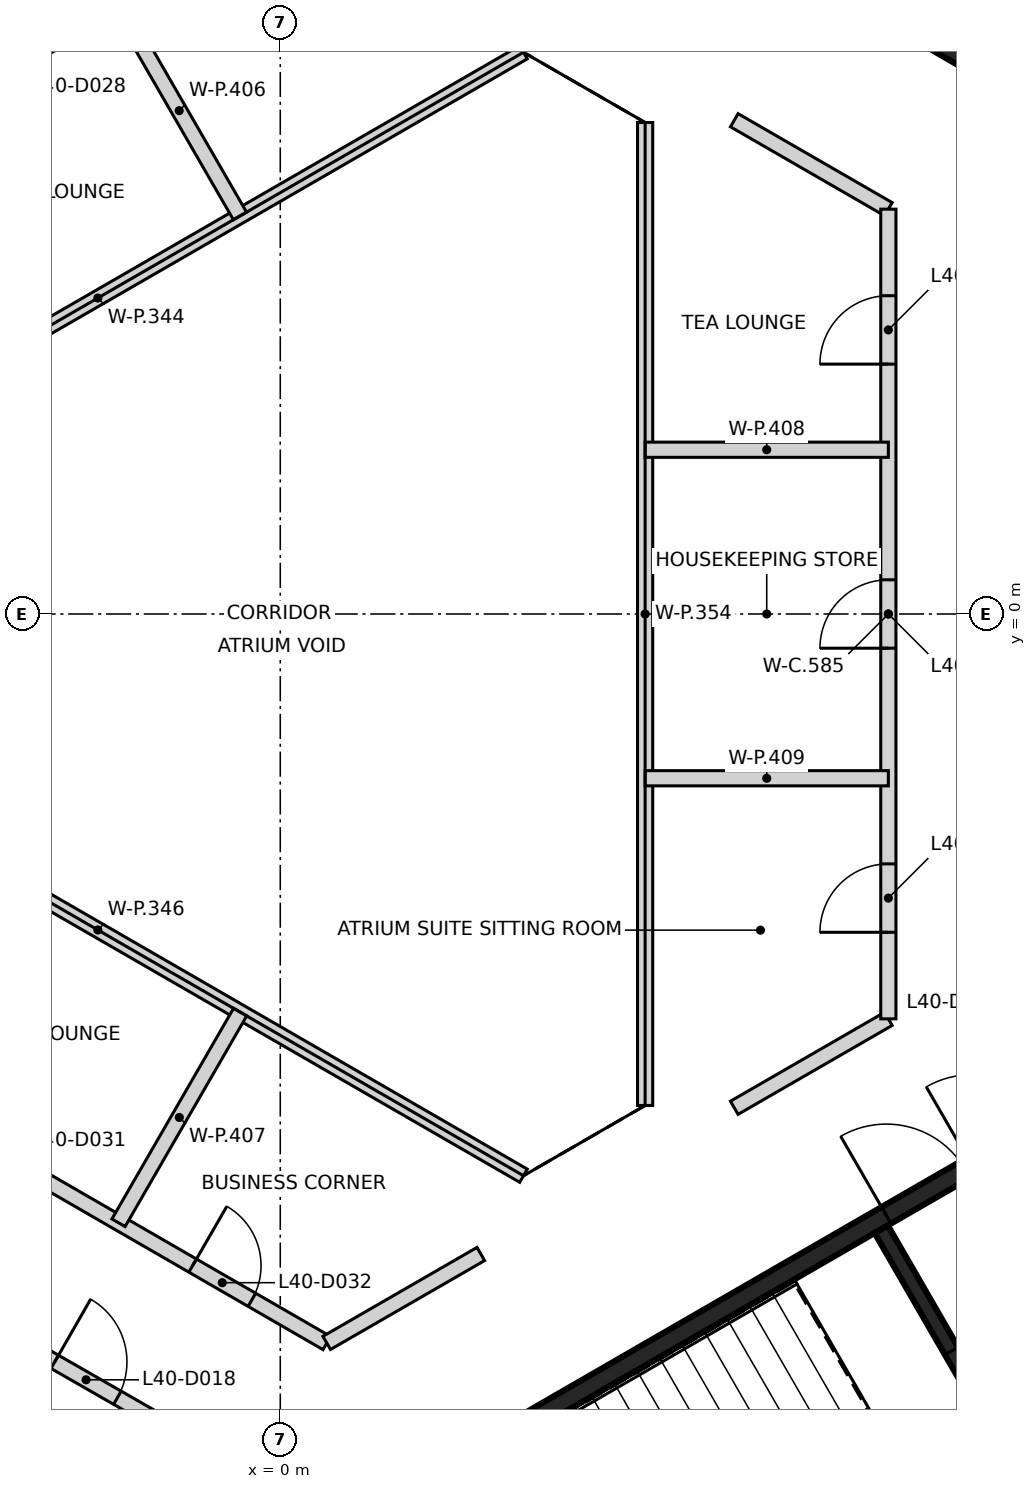
"""IFC4 building model, lengths in metres.
Left out: names, types, materials, properties, quantities, classifications, styles, units other than length and angle.
Written with IfcOpenShell. Run it as: python <this file> out.ifc"""

import sys

from ifc_helpers import new_model, si_unit, direction, frame, frame_2d, origin, place, context, subcontext, project, spatial, rectangle, extrude, element, fill, save


model = new_model("IFC4")
c1 = context("Model", 3, precision=1e-05, world=origin(), true_north=direction((0.0, 1.0)))
c2 = subcontext(c1, "Body", "Model", "MODEL_VIEW")
j1 = project(units=[si_unit("LENGTHUNIT", "METRE"), si_unit("PLANEANGLEUNIT", "RADIAN")], contexts=[c1])
p1 = place(None, origin())
s1 = spatial("IfcSite", under=j1, at=p1, CompositionType="ELEMENT")
p2 = place(p1, origin())
s2 = spatial("IfcBuilding", under=s1, at=p2, CompositionType="ELEMENT")
p3 = place(p2, frame((0.0, 0.0, 161.2)))
s3 = spatial("IfcBuildingStorey", under=s2, at=p3, CompositionType="ELEMENT", Elevation=161.2)
p4 = place(p3, frame((10.42, 6.498, 0.0), z_axis=(0.0, 0.0, 1.0), x_axis=(-0.866021906294, 0.500006057782, 0.0)))
e1 = element("IfcWall", 1, at=p4, inside=s3, PredefinedType="SHEAR", context=c2, shape_type="SweptSolid", body=[
    extrude(rectangle(XDim=11.55, YDim=0.25, at=frame_2d((5.775, 0.0))), origin(), (0.0, 0.0, 1.0), 3.2),
])
p5 = place(p4, frame((10.025, 0.0, 0.0)))
e2 = element("IfcOpeningElement", 2, at=p5, cuts=e1, PredefinedType="OPENING", context=c2, shape_type="SweptSolid", body=[
    extrude(rectangle(XDim=1.2, YDim=2.1, at=frame_2d((0.6, 1.05))), frame((0.0, 0.135, 0.0), z_axis=(0.0, -1.0, 0.0), x_axis=(1.0, 0.0, 0.0)), (0.0, 0.0, 1.0), 0.27),
])
p6 = place(p4, frame((8.725, 0.0, 0.0)))
e3 = element("IfcOpeningElement", 3, at=p6, cuts=e1, PredefinedType="OPENING", context=c2, shape_type="SweptSolid", body=[
    extrude(rectangle(XDim=1.2, YDim=2.1, at=frame_2d((0.6, 1.05))), frame((0.0, 0.135, 0.0), z_axis=(0.0, -1.0, 0.0), x_axis=(1.0, 0.0, 0.0)), (0.0, 0.0, 1.0), 0.27),
])
p7 = place(p3, frame((0.417, -12.273, 0.0), z_axis=(0.0, 0.0, 1.0), x_axis=(0.866021906294, 0.500006057782, 0.0)))
e4 = element("IfcWall", 4, at=p7, inside=s3, PredefinedType="SHEAR", context=c2, shape_type="SweptSolid", body=[
    extrude(rectangle(XDim=11.55, YDim=0.25, at=frame_2d((5.775, 0.0))), origin(), (0.0, 0.0, 1.0), 3.2),
])
p8 = place(p7, frame((10.025, 0.0, 0.0)))
e5 = element("IfcOpeningElement", 5, at=p8, cuts=e4, PredefinedType="OPENING", context=c2, shape_type="SweptSolid", body=[
    extrude(rectangle(XDim=1.2, YDim=2.1, at=frame_2d((0.6, 1.05))), frame((0.0, 0.135, 0.0), z_axis=(0.0, -1.0, 0.0), x_axis=(1.0, 0.0, 0.0)), (0.0, 0.0, 1.0), 0.27),
])
p9 = place(p7, frame((8.725, 0.0, 0.0)))
e6 = element("IfcOpeningElement", 6, at=p9, cuts=e4, PredefinedType="OPENING", context=c2, shape_type="SweptSolid", body=[
    extrude(rectangle(XDim=1.2, YDim=2.1, at=frame_2d((0.6, 1.05))), frame((0.0, 0.135, 0.0), z_axis=(0.0, -1.0, 0.0), x_axis=(1.0, 0.0, 0.0)), (0.0, 0.0, 1.0), 0.27),
])
p10 = place(p3, frame((7.906, -8.094, 0.0), z_axis=(0.0, 0.0, 1.0), x_axis=(0.500024287448, -0.866011380966, 0.0)))
e7 = element("IfcWall", 7, at=p10, inside=s3, PredefinedType="SHEAR", context=c2, shape_type="SweptSolid", body=[
    extrude(rectangle(XDim=5.251, YDim=0.2, at=frame_2d((2.625, 0.0))), origin(), (0.0, 0.0, 1.0), 3.2),
])
p11 = place(p10, frame((1.849, 0.0, 0.0)))
e8 = element("IfcOpeningElement", 8, at=p11, cuts=e7, PredefinedType="OPENING", context=c2, shape_type="SweptSolid", body=[
    extrude(rectangle(XDim=1.4, YDim=2.1, at=frame_2d((0.7, 1.05))), frame((0.0, 0.11, 0.0), z_axis=(0.0, -1.0, 0.0), x_axis=(1.0, 0.0, 0.0)), (0.0, 0.0, 1.0), 0.22),
])
p12 = place(p3, frame((-10.642, -5.44, 0.0), z_axis=(0.0, 0.0, 1.0), x_axis=(0.867610688994, -0.497244097344, 0.0)))
e9 = element("IfcWall", 9, at=p12, inside=s3, PredefinedType="PARTITIONING", context=c2, shape_type="SweptSolid", body=[
    extrude(rectangle(XDim=10.464, YDim=0.2, at=frame_2d((5.232, 0.0))), origin(), (0.0, 0.0, 1.0), 3.2),
])
p13 = place(p12, frame((0.2, 0.0, 0.0)))
e10 = element("IfcOpeningElement", 10, at=p13, cuts=e9, PredefinedType="OPENING", context=c2, shape_type="SweptSolid", body=[
    extrude(rectangle(XDim=0.95, YDim=2.1, at=frame_2d((0.475, 1.05))), frame((0.0, 0.11, 0.0), z_axis=(0.0, -1.0, 0.0), x_axis=(1.0, 0.0, 0.0)), (0.0, 0.0, 1.0), 0.22),
])
p14 = place(p12, frame((7.519, 0.0, 0.0)))
e11 = element("IfcOpeningElement", 11, at=p14, cuts=e9, PredefinedType="OPENING", context=c2, shape_type="SweptSolid", body=[
    extrude(rectangle(XDim=0.95, YDim=2.1, at=frame_2d((0.475, 1.05))), frame((0.0, 0.11, 0.0), z_axis=(0.0, -1.0, 0.0), x_axis=(1.0, 0.0, 0.0)), (0.0, 0.0, 1.0), 0.22),
])
p15 = place(p12, frame((8.846, 0.0, 0.0)))
e12 = element("IfcOpeningElement", 12, at=p15, cuts=e9, PredefinedType="OPENING", context=c2, shape_type="SweptSolid", body=[
    extrude(rectangle(XDim=0.95, YDim=2.1, at=frame_2d((0.475, 1.05))), frame((0.0, 0.11, 0.0), z_axis=(0.0, -1.0, 0.0), x_axis=(1.0, 0.0, 0.0)), (0.0, 0.0, 1.0), 0.22),
])
p16 = place(p3, frame((-8.612, -4.265, 0.0), z_axis=(0.0, 0.0, 1.0), x_axis=(0.865984415152, -0.500070987675, 0.0)))
e13 = element("IfcWall", 13, at=p16, inside=s3, PredefinedType="PARTITIONING", context=c2, shape_type="SweptSolid", body=[
    extrude(rectangle(XDim=10.651, YDim=0.2, at=frame_2d((5.326, 0.0))), origin(), (0.0, 0.0, 1.0), 3.2),
])
p17 = place(p16, frame((1.138, 0.0, 0.0)))
e14 = element("IfcOpeningElement", 14, at=p17, cuts=e13, PredefinedType="OPENING", context=c2, shape_type="SweptSolid", body=[
    extrude(rectangle(XDim=0.9, YDim=2.1, at=frame_2d((0.45, 1.05))), frame((0.0, 0.11, 0.0), z_axis=(0.0, -1.0, 0.0), x_axis=(1.0, 0.0, 0.0)), (0.0, 0.0, 1.0), 0.22),
])
p18 = place(p16, frame((4.876, 0.0, 0.0)))
e15 = element("IfcOpeningElement", 15, at=p18, cuts=e13, PredefinedType="OPENING", context=c2, shape_type="SweptSolid", body=[
    extrude(rectangle(XDim=0.9, YDim=2.1, at=frame_2d((0.45, 1.05))), frame((0.0, 0.11, 0.0), z_axis=(0.0, -1.0, 0.0), x_axis=(1.0, 0.0, 0.0)), (0.0, 0.0, 1.0), 0.22),
])
p19 = place(p16, frame((8.613, 0.0, 0.0)))
e16 = element("IfcOpeningElement", 16, at=p19, cuts=e13, PredefinedType="OPENING", context=c2, shape_type="SweptSolid", body=[
    extrude(rectangle(XDim=0.9, YDim=2.1, at=frame_2d((0.45, 1.05))), frame((0.0, 0.11, 0.0), z_axis=(0.0, -1.0, 0.0), x_axis=(1.0, 0.0, 0.0)), (0.0, 0.0, 1.0), 0.22),
])
p20 = place(p3, frame((-8.612, 4.265, 0.0), z_axis=(0.0, 0.0, 1.0), x_axis=(0.865984415152, 0.500070987675, 0.0)))
e17 = element("IfcWall", 17, at=p20, inside=s3, PredefinedType="PARTITIONING", context=c2, shape_type="SweptSolid", body=[
    extrude(rectangle(XDim=10.651, YDim=0.2, at=frame_2d((5.326, 0.0))), origin(), (0.0, 0.0, 1.0), 3.2),
])
p21 = place(p20, frame((8.613, 0.0, 0.0)))
e18 = element("IfcOpeningElement", 18, at=p21, cuts=e17, PredefinedType="OPENING", context=c2, shape_type="SweptSolid", body=[
    extrude(rectangle(XDim=0.9, YDim=2.1, at=frame_2d((0.45, 1.05))), frame((0.0, 0.11, 0.0), z_axis=(0.0, -1.0, 0.0), x_axis=(1.0, 0.0, 0.0)), (0.0, 0.0, 1.0), 0.22),
])
p22 = place(p20, frame((4.876, 0.0, 0.0)))
e19 = element("IfcOpeningElement", 19, at=p22, cuts=e17, PredefinedType="OPENING", context=c2, shape_type="SweptSolid", body=[
    extrude(rectangle(XDim=0.9, YDim=2.1, at=frame_2d((0.45, 1.05))), frame((0.0, 0.11, 0.0), z_axis=(0.0, -1.0, 0.0), x_axis=(1.0, 0.0, 0.0)), (0.0, 0.0, 1.0), 0.22),
])
p23 = place(p20, frame((1.138, 0.0, 0.0)))
e20 = element("IfcOpeningElement", 20, at=p23, cuts=e17, PredefinedType="OPENING", context=c2, shape_type="SweptSolid", body=[
    extrude(rectangle(XDim=0.9, YDim=2.1, at=frame_2d((0.45, 1.05))), frame((0.0, 0.11, 0.0), z_axis=(0.0, -1.0, 0.0), x_axis=(1.0, 0.0, 0.0)), (0.0, 0.0, 1.0), 0.22),
])
p24 = place(p3, frame((-8.462, 6.664, 0.0), z_axis=(0.0, 0.0, 1.0), x_axis=(0.864575369233, 0.502503165081, 0.0)))
e21 = element("IfcWall", 21, at=p24, inside=s3, PredefinedType="PARTITIONING", context=c2, shape_type="SweptSolid", body=[
    extrude(rectangle(XDim=10.492, YDim=0.2, at=frame_2d((5.246, 0.0))), origin(), (0.0, 0.0, 1.0), 3.2),
])
p25 = place(p24, frame((9.292, 0.0, 0.0)))
e22 = element("IfcOpeningElement", 22, at=p25, cuts=e21, PredefinedType="OPENING", context=c2, shape_type="SweptSolid", body=[
    extrude(rectangle(XDim=1.0, YDim=2.1, at=frame_2d((0.5, 1.05))), frame((0.0, 0.11, 0.0), z_axis=(0.0, -1.0, 0.0), x_axis=(1.0, 0.0, 0.0)), (0.0, 0.0, 1.0), 0.22),
])
p26 = place(p24, frame((2.024, 0.0, 0.0)))
e23 = element("IfcOpeningElement", 23, at=p26, cuts=e21, PredefinedType="OPENING", context=c2, shape_type="SweptSolid", body=[
    extrude(rectangle(XDim=0.95, YDim=2.1, at=frame_2d((0.475, 1.05))), frame((0.0, 0.11, 0.0), z_axis=(0.0, -1.0, 0.0), x_axis=(1.0, 0.0, 0.0)), (0.0, 0.0, 1.0), 0.22),
])
p27 = place(p24, frame((0.698, 0.0, 0.0)))
e24 = element("IfcOpeningElement", 24, at=p27, cuts=e21, PredefinedType="OPENING", context=c2, shape_type="SweptSolid", body=[
    extrude(rectangle(XDim=0.95, YDim=2.1, at=frame_2d((0.475, 1.05))), frame((0.0, 0.11, 0.0), z_axis=(0.0, -1.0, 0.0), x_axis=(1.0, 0.0, 0.0)), (0.0, 0.0, 1.0), 0.22),
])
p28 = place(p3, frame((0.611, -9.589, 0.0), z_axis=(0.0, 0.0, 1.0), x_axis=(0.866220316572, 0.499662249082, 0.0)))
e25 = element("IfcWall", 25, at=p28, inside=s3, PredefinedType="PARTITIONING", context=c2, shape_type="SweptSolid", body=[
    extrude(rectangle(XDim=2.34, YDim=0.2, at=frame_2d((1.17, 0.0))), origin(), (0.0, 0.0, 1.0), 3.2),
])
for number, where, z_axis, x_axis in (
    (26, (5.973, -6.496, 0.0), (0.0, 0.0, 1.0), (0.866, 0.5, 0.0)),
    (27, (5.973, 6.496, 0.0), (0.0, 0.0, 1.0), (0.866, -0.5, 0.0)),
):
    element("IfcWall", number, at=place(p3, frame(where, z_axis=z_axis, x_axis=x_axis)), inside=s3, PredefinedType="PARTITIONING", context=c2, shape_type="SweptSolid", body=[
        extrude(rectangle(XDim=2.341, YDim=0.2, at=frame_2d((1.17, 0.0))), origin(), (0.0, 0.0, 1.0), 3.2),
    ])
p29 = place(p3, frame((8.0, -5.326, 0.0), z_axis=(0.0, 0.0, 1.0), x_axis=(0.0, 1.0, 0.0)))
e28 = element("IfcWall", 28, at=p29, inside=s3, PredefinedType="PARTITIONING", context=c2, shape_type="SweptSolid", body=[
    extrude(rectangle(XDim=10.652, YDim=0.2, at=frame_2d((5.326, 0.0))), origin(), (0.0, 0.0, 1.0), 3.2),
])
p30 = place(p29, frame((1.138, 0.0, 0.0)))
e29 = element("IfcOpeningElement", 29, at=p30, cuts=e28, PredefinedType="OPENING", context=c2, shape_type="SweptSolid", body=[
    extrude(rectangle(XDim=0.9, YDim=2.1, at=frame_2d((0.45, 1.05))), frame((0.0, 0.11, 0.0), z_axis=(0.0, -1.0, 0.0), x_axis=(1.0, 0.0, 0.0)), (0.0, 0.0, 1.0), 0.22),
])
p31 = place(p29, frame((4.876, 0.0, 0.0)))
e30 = element("IfcOpeningElement", 30, at=p31, cuts=e28, PredefinedType="OPENING", context=c2, shape_type="SweptSolid", body=[
    extrude(rectangle(XDim=0.9, YDim=2.1, at=frame_2d((0.45, 1.05))), frame((0.0, 0.11, 0.0), z_axis=(0.0, -1.0, 0.0), x_axis=(1.0, 0.0, 0.0)), (0.0, 0.0, 1.0), 0.22),
])
p32 = place(p29, frame((8.614, 0.0, 0.0)))
e31 = element("IfcOpeningElement", 31, at=p32, cuts=e28, PredefinedType="OPENING", context=c2, shape_type="SweptSolid", body=[
    extrude(rectangle(XDim=0.9, YDim=2.1, at=frame_2d((0.45, 1.05))), frame((0.0, 0.11, 0.0), z_axis=(0.0, -1.0, 0.0), x_axis=(1.0, 0.0, 0.0)), (0.0, 0.0, 1.0), 0.22),
])
for number, where, z_axis, x_axis in (
    (32, (-8.0, 0.924, 0.0), (0.0, 0.0, 1.0), (0.866, 0.5, 0.0)),
    (33, (-8.0, -0.924, 0.0), (0.0, 0.0, 1.0), (0.866, -0.5, 0.0)),
):
    element("IfcWall", number, at=place(p3, frame(where, z_axis=z_axis, x_axis=x_axis)), inside=s3, PredefinedType="PARTITIONING", context=c2, shape_type="SweptSolid", body=[
        extrude(rectangle(XDim=12.932, YDim=0.2, at=frame_2d((6.466, 0.0))), origin(), (0.0, 0.0, 1.0), 2.3),
    ])
p33 = place(p3, frame((-2.13, 8.008, 0.0), z_axis=(0.0, 0.0, 1.0), x_axis=(0.499872130319, -0.866099216793, 0.0)))
e34 = element("IfcWall", 34, at=p33, inside=s3, PredefinedType="PARTITIONING", context=c2, shape_type="SweptSolid", body=[
    extrude(rectangle(XDim=3.2, YDim=0.2, at=frame_2d((1.6, 0.0))), origin(), (0.0, 0.0, 1.0), 2.3),
])
p34 = place(p3, frame((-2.128, -8.009, 0.0), z_axis=(0.0, 0.0, 1.0), x_axis=(0.499986558861, 0.866033163891, 0.0)))
e35 = element("IfcWall", 35, at=p34, inside=s3, PredefinedType="PARTITIONING", context=c2, shape_type="SweptSolid", body=[
    extrude(rectangle(XDim=3.201, YDim=0.2, at=frame_2d((1.6, 0.0))), origin(), (0.0, 0.0, 1.0), 2.3),
])
p35 = place(p3, frame((4.8, -6.466, 0.0), z_axis=(0.0, 0.0, 1.0), x_axis=(0.0, 1.0, 0.0)))
e36 = element("IfcWall", 36, at=p35, inside=s3, PredefinedType="PARTITIONING", context=c2, shape_type="SweptSolid", body=[
    extrude(rectangle(XDim=12.932, YDim=0.2, at=frame_2d((6.466, 0.0))), origin(), (0.0, 0.0, 1.0), 2.3),
])
p36 = place(p3, frame((4.8, 2.161, 0.0), z_axis=(0.0, 0.0, 1.0), x_axis=(1.0, 0.0, 0.0)))
e37 = element("IfcWall", 37, at=p36, inside=s3, PredefinedType="PARTITIONING", context=c2, shape_type="SweptSolid", body=[
    extrude(rectangle(XDim=3.2, YDim=0.2, at=frame_2d((1.6, 0.0))), origin(), (0.0, 0.0, 1.0), 2.3),
])
p37 = place(p3, frame((4.8, -2.161, 0.0), z_axis=(0.0, 0.0, 1.0), x_axis=(1.0, 0.0, 0.0)))
e38 = element("IfcWall", 38, at=p37, inside=s3, PredefinedType="PARTITIONING", context=c2, shape_type="SweptSolid", body=[
    extrude(rectangle(XDim=3.2, YDim=0.2, at=frame_2d((1.6, 0.0))), origin(), (0.0, 0.0, 1.0), 3.2),
])
p38 = place(p9, origin())
e39 = element("IfcDoor", 39, at=p38, inside=s3, OperationType="SINGLE_SWING_RIGHT", PredefinedType="DOOR", context=c2, shape_type="SweptSolid", body=[
    extrude(rectangle(XDim=1.2, YDim=2.1, at=frame_2d((0.6, 1.05))), frame((0.0, 0.025, 0.0), z_axis=(0.0, -1.0, 0.0), x_axis=(1.0, 0.0, 0.0)), (0.0, 0.0, 1.0), 0.05),
])
fill(e6, e39)
p39 = place(p11, origin())
e40 = element("IfcDoor", 40, at=p39, inside=s3, OperationType="SINGLE_SWING_RIGHT", PredefinedType="DOOR", context=c2, shape_type="SweptSolid", body=[
    extrude(rectangle(XDim=1.4, YDim=2.1, at=frame_2d((0.7, 1.05))), frame((0.0, 0.025, 0.0), z_axis=(0.0, -1.0, 0.0), x_axis=(1.0, 0.0, 0.0)), (0.0, 0.0, 1.0), 0.05),
])
fill(e8, e40)
p40 = place(p15, frame((0.95, 0.0, 0.0), z_axis=(0.0, 0.0, 1.0), x_axis=(-1.0, 0.0, 0.0)))
e41 = element("IfcDoor", 41, at=p40, inside=s3, OperationType="SINGLE_SWING_LEFT", PredefinedType="DOOR", context=c2, shape_type="SweptSolid", body=[
    extrude(rectangle(XDim=0.95, YDim=2.1, at=frame_2d((0.475, 1.05))), frame((0.0, 0.025, 0.0), z_axis=(0.0, -1.0, 0.0), x_axis=(1.0, 0.0, 0.0)), (0.0, 0.0, 1.0), 0.05),
])
fill(e12, e41)
p41 = place(p30, origin())
e42 = element("IfcDoor", 42, at=p41, inside=s3, OperationType="SINGLE_SWING_LEFT", PredefinedType="DOOR", context=c2, shape_type="SweptSolid", body=[
    extrude(rectangle(XDim=0.9, YDim=2.1, at=frame_2d((0.45, 1.05))), frame((0.0, 0.025, 0.0), z_axis=(0.0, -1.0, 0.0), x_axis=(1.0, 0.0, 0.0)), (0.0, 0.0, 1.0), 0.05),
])
fill(e29, e42)
p42 = place(p31, origin())
e43 = element("IfcDoor", 43, at=p42, inside=s3, OperationType="SINGLE_SWING_LEFT", PredefinedType="DOOR", context=c2, shape_type="SweptSolid", body=[
    extrude(rectangle(XDim=0.9, YDim=2.1, at=frame_2d((0.45, 1.05))), frame((0.0, 0.025, 0.0), z_axis=(0.0, -1.0, 0.0), x_axis=(1.0, 0.0, 0.0)), (0.0, 0.0, 1.0), 0.05),
])
fill(e30, e43)
p43 = place(p32, origin())
e44 = element("IfcDoor", 44, at=p43, inside=s3, OperationType="SINGLE_SWING_LEFT", PredefinedType="DOOR", context=c2, shape_type="SweptSolid", body=[
    extrude(rectangle(XDim=0.9, YDim=2.1, at=frame_2d((0.45, 1.05))), frame((0.0, 0.025, 0.0), z_axis=(0.0, -1.0, 0.0), x_axis=(1.0, 0.0, 0.0)), (0.0, 0.0, 1.0), 0.05),
])
fill(e31, e44)
p44 = place(p19, origin())
e45 = element("IfcDoor", 45, at=p44, inside=s3, OperationType="SINGLE_SWING_LEFT", PredefinedType="DOOR", context=c2, shape_type="SweptSolid", body=[
    extrude(rectangle(XDim=0.9, YDim=2.1, at=frame_2d((0.45, 1.05))), frame((0.0, 0.025, 0.0), z_axis=(0.0, -1.0, 0.0), x_axis=(1.0, 0.0, 0.0)), (0.0, 0.0, 1.0), 0.05),
])
fill(e16, e45)
save(model, sys.argv[1])
